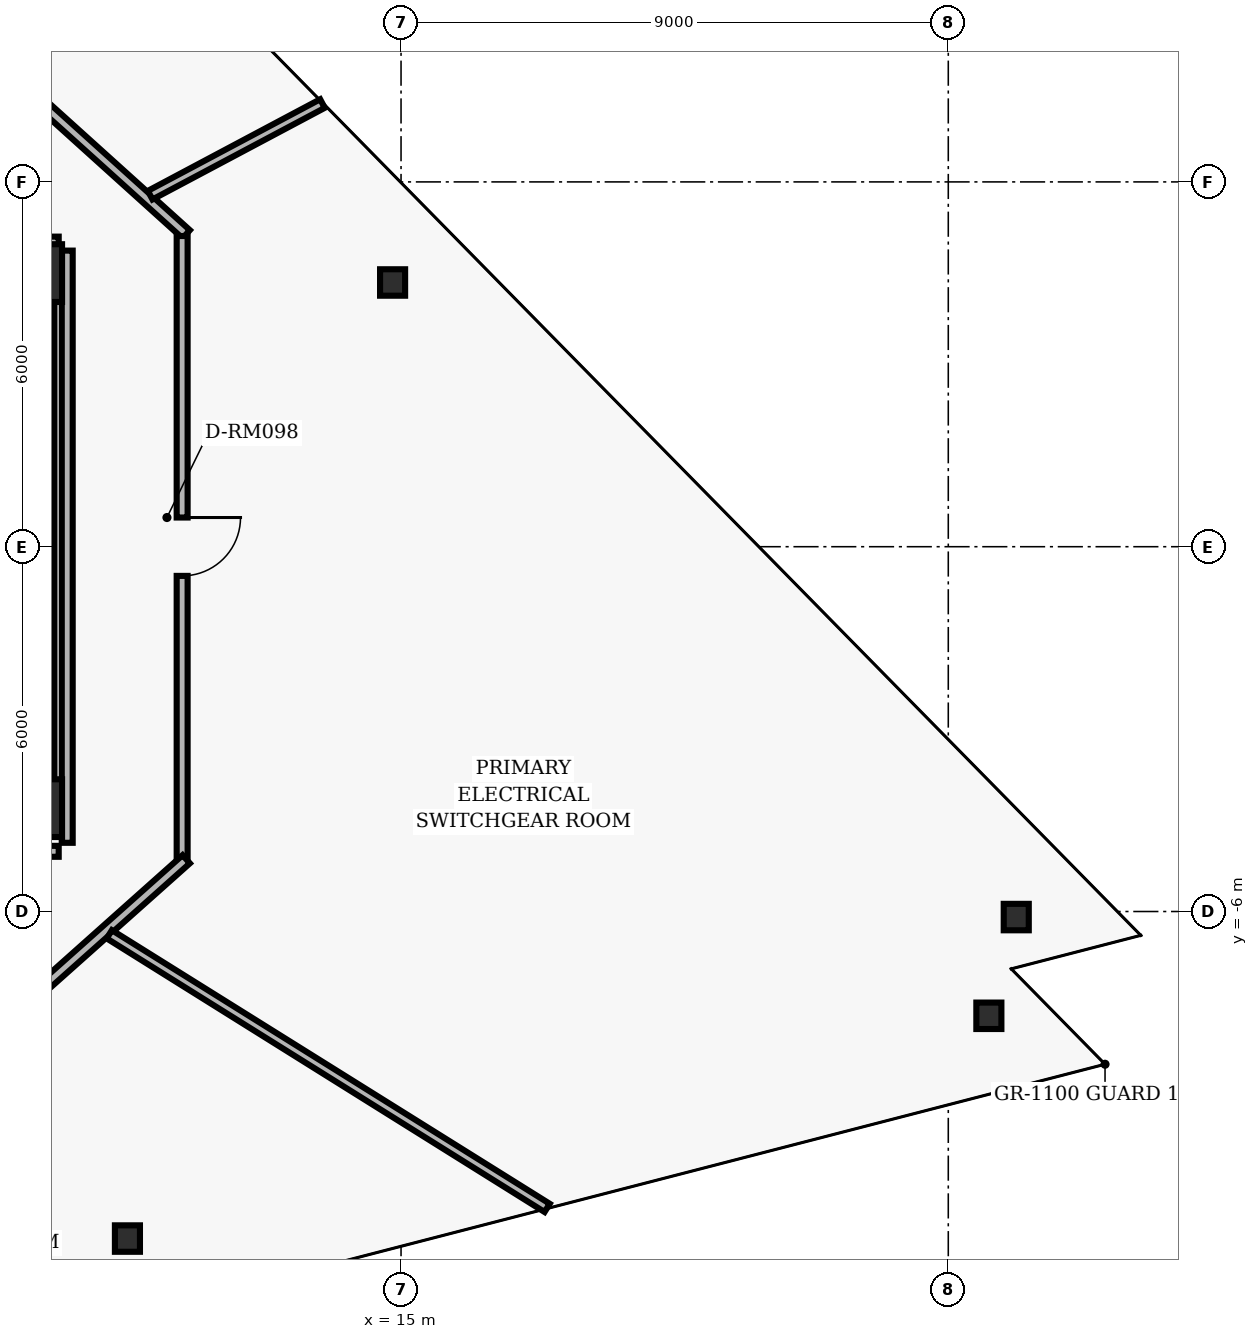
"""IFC4 building model, lengths in metres.
Left out: names, types, materials, properties, quantities, classifications, styles, units other than length and angle.
Written with IfcOpenShell. Run it as: python <this file> out.ifc"""

import sys

from ifc_helpers import new_model, si_unit, direction, frame, frame_2d, origin, origin_2d, place, context, subcontext, project, spatial, rectangle, hollow_rectangle, i_section, extrude, element, fill, save


model = new_model("IFC4")
c1 = context("Model", 3, precision=1e-05, world=origin(), true_north=direction((0.0, 1.0)))
c2 = subcontext(c1, "Body", "Model", "MODEL_VIEW")
j1 = project(units=[si_unit("LENGTHUNIT", "METRE"), si_unit("PLANEANGLEUNIT", "RADIAN")], contexts=[c1])
p1 = place(None, origin())
s1 = spatial("IfcSite", under=j1, at=p1, CompositionType="ELEMENT")
p2 = place(p1, origin())
s2 = spatial("IfcBuilding", under=s1, at=p2, CompositionType="ELEMENT")
p3 = place(p2, frame((0.0, 0.0, 100.8)))
s3 = spatial("IfcBuildingStorey", under=s2, at=p3, CompositionType="ELEMENT", Elevation=100.8)
for number, where, z_axis, x_axis in (
    (1, (8.95, 4.5, 0.0), (0.0, 0.0, 1.0), (1.0, 0.0, 0.0)),
    (2, (8.95, -4.3, 0.0), (0.0, 0.0, 1.0), (1.0, 0.0, 0.0)),
):
    element("IfcColumn", number, at=place(p3, frame(where, z_axis=z_axis, x_axis=x_axis)), inside=s3, PredefinedType="COLUMN", context=c2, shape_type="SweptSolid", body=[
        extrude(hollow_rectangle(XDim=0.95, YDim=0.95, WallThickness=0.06, InnerFilletRadius=0.02, OuterFilletRadius=0.04, at=origin_2d()), origin(), (0.0, 0.0, 1.0), 3.84),
    ])
p4 = place(p3, frame((8.95, -3.825, 0.0), z_axis=(0.0, 0.0, 1.0), x_axis=(0.0, 1.0, 0.0)))
e3 = element("IfcWall", 3, at=p4, inside=s3, PredefinedType="SHEAR", context=c2, shape_type="SweptSolid", body=[
    extrude(rectangle(XDim=7.85, YDim=0.7, at=frame_2d((3.925, 0.0))), origin(), (0.0, 0.0, 1.0), 3.418),
])
for number, where, z_axis, x_axis in (
    (4, (25.118, -6.092, 0.0), (0.0, 0.0, 1.0), (1.0, 0.0, 0.0)),
    (5, (14.861, 4.346, 0.0), (0.0, 0.0, 1.0), (1.0, 0.0, 0.0)),
    (6, (10.5, -11.379, 0.0), (0.0, 0.0, 1.0), (1.0, 0.0, 0.0)),
    (7, (24.667, -7.715, 0.0), (0.0, 0.0, 1.0), (1.0, 0.0, 0.0)),
):
    element("IfcColumn", number, at=place(p3, frame(where, z_axis=z_axis, x_axis=x_axis)), inside=s3, PredefinedType="COLUMN", context=c2, shape_type="SweptSolid", body=[
        extrude(i_section(OverallWidth=0.412, OverallDepth=0.435, WebThickness=0.036, FlangeThickness=0.057, FilletRadius=0.022, at=origin_2d()), origin(), (0.0, 0.0, 1.0), 3.84),
    ])
p5 = place(p3, frame((6.867, 9.29, 0.0), z_axis=(0.0, 0.0, 1.0), x_axis=(0.742486327971, -0.669861219042, 0.0)))
e8 = element("IfcWall", 8, at=p5, inside=s3, PredefinedType="PARTITIONING", context=c2, shape_type="SweptSolid", body=[
    extrude(rectangle(XDim=6.196, YDim=0.18, at=frame_2d((3.098, 0.0))), origin(), (0.0, 0.0, 1.0), 2.907),
])
p6 = place(p3, frame((11.4, 5.11, 0.0), z_axis=(0.0, 0.0, 1.0), x_axis=(0.0, -1.0, 0.0)))
e9 = element("IfcWall", 9, at=p6, inside=s3, PredefinedType="PARTITIONING", context=c2, shape_type="SweptSolid", body=[
    extrude(rectangle(XDim=10.22, YDim=0.18, at=frame_2d((5.11, 0.0))), origin(), (0.0, 0.0, 1.0), 2.907),
])
p7 = place(p6, frame((4.63, 0.0, 0.0)))
e10 = element("IfcOpeningElement", 10, at=p7, cuts=e9, PredefinedType="OPENING", context=c2, shape_type="SweptSolid", body=[
    extrude(rectangle(XDim=0.96, YDim=2.02, at=frame_2d((0.48, 1.01))), frame((0.0, 0.1, 0.0), z_axis=(0.0, -1.0, 0.0), x_axis=(1.0, 0.0, 0.0)), (0.0, 0.0, 1.0), 0.2),
])
p8 = place(p3, frame((11.467, -5.14, 0.0), z_axis=(0.0, 0.0, 1.0), x_axis=(-0.746516597114, -0.665366793756, 0.0)))
e11 = element("IfcWall", 11, at=p8, inside=s3, PredefinedType="PARTITIONING", context=c2, shape_type="SweptSolid", body=[
    extrude(rectangle(XDim=6.342, YDim=0.18, at=frame_2d((3.171, 0.0))), origin(), (0.0, 0.0, 1.0), 3.393),
])
p9 = place(p8, frame((3.445, 0.0, 0.0)))
e12 = element("IfcOpeningElement", 12, at=p9, cuts=e11, PredefinedType="OPENING", context=c2, shape_type="SweptSolid", body=[
    extrude(rectangle(XDim=0.96, YDim=2.02, at=frame_2d((0.48, 1.01))), frame((0.0, 0.1, 0.0), z_axis=(0.0, -1.0, 0.0), x_axis=(1.0, 0.0, 0.0)), (0.0, 0.0, 1.0), 0.2),
])
p10 = place(p3, frame((6.03, -5.01, 0.0), z_axis=(0.0, 0.0, 1.0), x_axis=(1.0, 0.0, 0.0)))
e13 = element("IfcWall", 13, at=p10, inside=s3, PredefinedType="PARTITIONING", context=c2, shape_type="SweptSolid", body=[
    extrude(rectangle(XDim=3.34, YDim=0.18, at=frame_2d((1.67, 0.0))), origin(), (0.0, 0.0, 1.0), 3.393),
])
p11 = place(p3, frame((9.51, -4.87, 0.0), z_axis=(0.0, 0.0, 1.0), x_axis=(0.0, 1.0, 0.0)))
e14 = element("IfcWall", 14, at=p11, inside=s3, PredefinedType="PARTITIONING", context=c2, shape_type="SweptSolid", body=[
    extrude(rectangle(XDim=9.74, YDim=0.18, at=frame_2d((4.87, 0.0))), origin(), (0.0, 0.0, 1.0), 2.6),
])
p12 = place(p3, frame((9.37, 5.01, 0.0), z_axis=(0.0, 0.0, 1.0), x_axis=(-1.0, 0.0, 0.0)))
e15 = element("IfcWall", 15, at=p12, inside=s3, PredefinedType="PARTITIONING", context=c2, shape_type="SweptSolid", body=[
    extrude(rectangle(XDim=2.808, YDim=0.18, at=frame_2d((1.404, 0.0))), origin(), (0.0, 0.0, 1.0), 3.393),
])
p13 = place(p3, frame((10.202, -6.375, 0.0), z_axis=(0.0, 0.0, 1.0), x_axis=(0.848062908476, -0.529895558829, 0.0)))
e16 = element("IfcWall", 16, at=p13, inside=s3, PredefinedType="PARTITIONING", context=c2, shape_type="SweptSolid", body=[
    extrude(rectangle(XDim=8.491, YDim=0.16, at=frame_2d((4.246, 0.0))), origin(), (0.0, 0.0, 1.0), 3.393),
])
p14 = place(p3, frame((10.874, 5.782, 0.0), z_axis=(0.0, 0.0, 1.0), x_axis=(0.882948212964, 0.469470396536, 0.0)))
e17 = element("IfcWall", 17, at=p14, inside=s3, PredefinedType="PARTITIONING", context=c2, shape_type="SweptSolid", body=[
    extrude(rectangle(XDim=3.209, YDim=0.16, at=frame_2d((1.604, 0.0))), origin(), (0.0, 0.0, 1.0), 3.393),
])
p15 = place(p7, origin())
e18 = element("IfcDoor", 18, at=p15, inside=s3, OperationType="SINGLE_SWING_LEFT", PredefinedType="DOOR", context=c2, shape_type="SweptSolid", body=[
    extrude(rectangle(XDim=0.96, YDim=2.02, at=frame_2d((0.48, 1.01))), frame((0.0, 0.025, 0.0), z_axis=(0.0, -1.0, 0.0), x_axis=(1.0, 0.0, 0.0)), (0.0, 0.0, 1.0), 0.05),
])
fill(e10, e18)
save(model, sys.argv[1])
